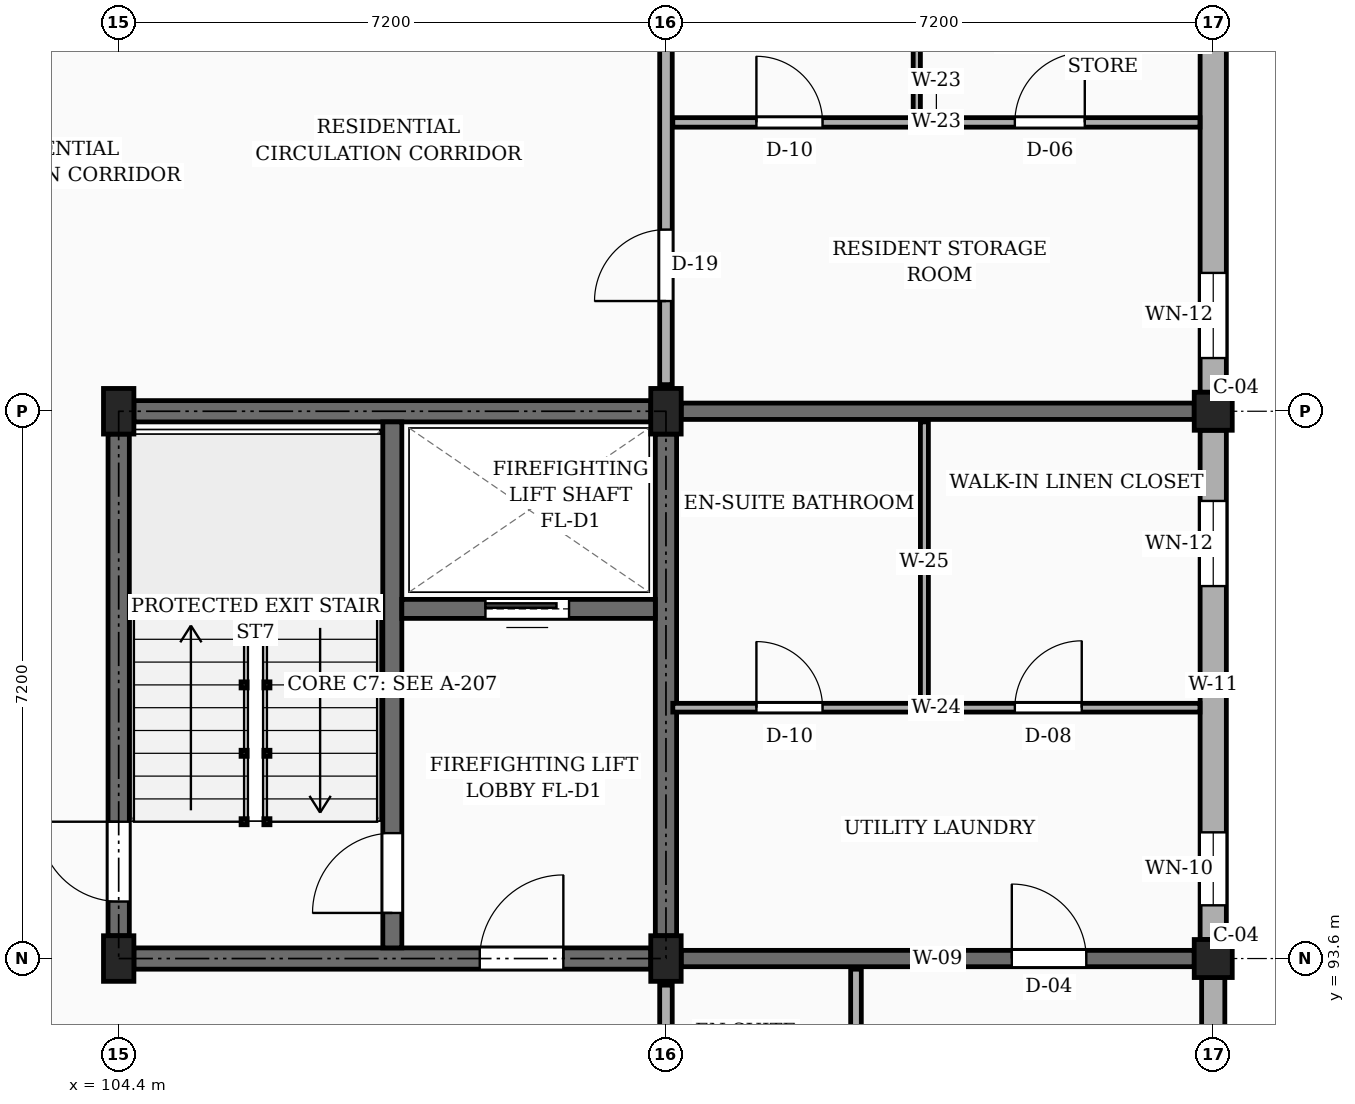
"""IFC4 building model, lengths in metres.
Left out: names, types, materials, properties, quantities, classifications, styles, units other than length and angle.
Written with IfcOpenShell. Run it as: python <this file> out.ifc"""

import sys

from ifc_helpers import new_model, si_unit, direction, frame, frame_2d, origin, origin_2d, place, context, subcontext, project, spatial, rectangle, extrude, element, fill, save


model = new_model("IFC4")
c1 = context("Model", 3, precision=1e-05, world=origin(), true_north=direction((0.0, 1.0)))
c2 = subcontext(c1, "Body", "Model", "MODEL_VIEW")
j1 = project(units=[si_unit("LENGTHUNIT", "METRE"), si_unit("PLANEANGLEUNIT", "RADIAN")], contexts=[c1])
p1 = place(None, origin())
s1 = spatial("IfcSite", under=j1, at=p1, CompositionType="ELEMENT")
p2 = place(p1, origin())
s2 = spatial("IfcBuilding", under=s1, at=p2, CompositionType="ELEMENT")
p3 = place(p2, frame((0.0, 0.0, 29.7)))
s3 = spatial("IfcBuildingStorey", under=s2, at=p3, CompositionType="ELEMENT", Elevation=29.7)
for number, where, z_axis, x_axis in (
    (1, (104.4, 93.6, 0.0), (0.0, 0.0, 1.0), (1.0, 0.0, 0.0)),
    (2, (104.4, 100.8, 0.0), (0.0, 0.0, 1.0), (1.0, 0.0, 0.0)),
    (3, (111.6, 93.6, 0.0), (0.0, 0.0, 1.0), (1.0, 0.0, 0.0)),
    (4, (111.6, 100.8, 0.0), (0.0, 0.0, 1.0), (1.0, 0.0, 0.0)),
):
    element("IfcColumn", number, at=place(p3, frame(where, z_axis=z_axis, x_axis=x_axis)), inside=s3, PredefinedType="COLUMN", context=c2, shape_type="SweptSolid", body=[
        extrude(rectangle(XDim=0.4, YDim=0.6, at=origin_2d()), origin(), (0.0, 0.0, 1.0), 3.15),
    ])
for number, where, z_axis, x_axis in (
    (5, (118.8, 93.6, 0.0), (0.0, 0.0, 1.0), (1.0, 0.0, 0.0)),
    (6, (118.8, 100.8, 0.0), (0.0, 0.0, 1.0), (1.0, 0.0, 0.0)),
):
    element("IfcColumn", number, at=place(p3, frame(where, z_axis=z_axis, x_axis=x_axis)), inside=s3, PredefinedType="COLUMN", context=c2, shape_type="SweptSolid", body=[
        extrude(rectangle(XDim=0.5, YDim=0.5, at=origin_2d()), origin(), (0.0, 0.0, 1.0), 3.15),
    ])
p4 = place(p3, frame((111.8, 93.6, 0.0), z_axis=(0.0, 0.0, 1.0), x_axis=(1.0, 0.0, 0.0)))
e7 = element("IfcWall", 7, at=p4, inside=s3, PredefinedType="SOLIDWALL", context=c2, shape_type="SweptSolid", body=[
    extrude(rectangle(XDim=6.75, YDim=0.215, at=frame_2d((3.375, 0.0))), origin(), (0.0, 0.0, 1.0), 2.19),
])
p5 = place(p4, frame((4.35, 0.0, 0.0)))
e8 = element("IfcOpeningElement", 8, at=p5, cuts=e7, PredefinedType="OPENING", context=c2, shape_type="SweptSolid", body=[
    extrude(rectangle(XDim=0.98, YDim=2.12, at=frame_2d((0.49, 1.06))), frame((0.0, 0.118, 0.0), z_axis=(0.0, -1.0, 0.0), x_axis=(1.0, 0.0, 0.0)), (0.0, 0.0, 1.0), 0.235),
])
p6 = place(p3, frame((111.8, 100.8, 0.0), z_axis=(0.0, 0.0, 1.0), x_axis=(1.0, 0.0, 0.0)))
e9 = element("IfcWall", 9, at=p6, inside=s3, PredefinedType="SOLIDWALL", context=c2, shape_type="SweptSolid", body=[
    extrude(rectangle(XDim=6.75, YDim=0.215, at=frame_2d((3.375, 0.0))), origin(), (0.0, 0.0, 1.0), 2.19),
])
p7 = place(p3, frame((118.8, 89.42, 0.0), z_axis=(0.0, 0.0, 1.0), x_axis=(0.0, 1.0, 0.0)))
e10 = element("IfcWall", 10, at=p7, inside=s3, PredefinedType="SOLIDWALL", context=c2, shape_type="SweptSolid", body=[
    extrude(rectangle(XDim=3.93, YDim=0.305, at=frame_2d((1.965, 0.0))), origin(), (0.0, 0.0, 1.0), 2.46),
])
p8 = place(p7, frame((1.86, 0.0, 0.78)))
e11 = element("IfcOpeningElement", 11, at=p8, cuts=e10, PredefinedType="OPENING", context=c2, shape_type="SweptSolid", body=[
    extrude(rectangle(XDim=0.88, YDim=1.26, at=frame_2d((0.44, 0.63))), frame((0.0, 0.163, 0.0), z_axis=(0.0, -1.0, 0.0), x_axis=(1.0, 0.0, 0.0)), (0.0, 0.0, 1.0), 0.325),
])
p9 = place(p3, frame((118.8, 93.85, 0.0), z_axis=(0.0, 0.0, 1.0), x_axis=(0.0, 1.0, 0.0)))
e12 = element("IfcWall", 12, at=p9, inside=s3, PredefinedType="SOLIDWALL", context=c2, shape_type="SweptSolid", body=[
    extrude(rectangle(XDim=6.7, YDim=0.345, at=frame_2d((3.35, 0.0))), origin(), (0.0, 0.0, 1.0), 2.46),
])
p10 = place(p9, frame((0.45, 0.0, 0.78)))
e13 = element("IfcOpeningElement", 13, at=p10, cuts=e12, PredefinedType="OPENING", context=c2, shape_type="SweptSolid", body=[
    extrude(rectangle(XDim=0.96, YDim=1.26, at=frame_2d((0.48, 0.63))), frame((0.0, 0.183, 0.0), z_axis=(0.0, -1.0, 0.0), x_axis=(1.0, 0.0, 0.0)), (0.0, 0.0, 1.0), 0.365),
])
p11 = place(p9, frame((4.65, 0.0, 0.78)))
e14 = element("IfcOpeningElement", 14, at=p11, cuts=e12, PredefinedType="OPENING", context=c2, shape_type="SweptSolid", body=[
    extrude(rectangle(XDim=1.12, YDim=1.26, at=frame_2d((0.56, 0.63))), frame((0.0, 0.183, 0.0), z_axis=(0.0, -1.0, 0.0), x_axis=(1.0, 0.0, 0.0)), (0.0, 0.0, 1.0), 0.365),
])
p12 = place(p3, frame((118.8, 101.05, 0.0), z_axis=(0.0, 0.0, 1.0), x_axis=(0.0, 1.0, 0.0)))
e15 = element("IfcWall", 15, at=p12, inside=s3, PredefinedType="SOLIDWALL", context=c2, shape_type="SweptSolid", body=[
    extrude(rectangle(XDim=6.7, YDim=0.345, at=frame_2d((3.35, 0.0))), origin(), (0.0, 0.0, 1.0), 2.46),
])
p13 = place(p12, frame((0.45, 0.0, 0.78)))
e16 = element("IfcOpeningElement", 16, at=p13, cuts=e15, PredefinedType="OPENING", context=c2, shape_type="SweptSolid", body=[
    extrude(rectangle(XDim=1.12, YDim=1.26, at=frame_2d((0.56, 0.63))), frame((0.0, 0.183, 0.0), z_axis=(0.0, -1.0, 0.0), x_axis=(1.0, 0.0, 0.0)), (0.0, 0.0, 1.0), 0.365),
])
p14 = place(p12, frame((4.65, 0.0, 0.78)))
e17 = element("IfcOpeningElement", 17, at=p14, cuts=e15, PredefinedType="OPENING", context=c2, shape_type="SweptSolid", body=[
    extrude(rectangle(XDim=1.28, YDim=1.26, at=frame_2d((0.64, 0.63))), frame((0.0, 0.183, 0.0), z_axis=(0.0, -1.0, 0.0), x_axis=(1.0, 0.0, 0.0)), (0.0, 0.0, 1.0), 0.365),
])
p15 = place(p3, frame((104.4, 93.9, 0.0), z_axis=(0.0, 0.0, 1.0), x_axis=(0.0, 1.0, 0.0)))
e18 = element("IfcWall", 18, at=p15, inside=s3, PredefinedType="SHEAR", context=c2, shape_type="SweptSolid", body=[
    extrude(rectangle(XDim=6.6, YDim=0.28, at=frame_2d((3.3, 0.0))), origin(), (0.0, 0.0, 1.0), 2.89),
])
p16 = place(p15, frame((0.45, 0.0, 0.0)))
e19 = element("IfcOpeningElement", 19, at=p16, cuts=e18, PredefinedType="OPENING", context=c2, shape_type="SweptSolid", body=[
    extrude(rectangle(XDim=1.05, YDim=2.15, at=frame_2d((0.525, 1.075))), frame((0.0, 0.15, 0.0), z_axis=(0.0, -1.0, 0.0), x_axis=(1.0, 0.0, 0.0)), (0.0, 0.0, 1.0), 0.3),
])
p17 = place(p3, frame((104.6, 100.8, 0.0), z_axis=(0.0, 0.0, 1.0), x_axis=(1.0, 0.0, 0.0)))
e20 = element("IfcWall", 20, at=p17, inside=s3, PredefinedType="SHEAR", context=c2, shape_type="SweptSolid", body=[
    extrude(rectangle(XDim=6.8, YDim=0.28, at=frame_2d((3.4, 0.0))), origin(), (0.0, 0.0, 1.0), 2.89),
])
p18 = place(p3, frame((111.6, 93.9, 0.0), z_axis=(0.0, 0.0, 1.0), x_axis=(0.0, 1.0, 0.0)))
e21 = element("IfcWall", 21, at=p18, inside=s3, PredefinedType="SHEAR", context=c2, shape_type="SweptSolid", body=[
    extrude(rectangle(XDim=6.6, YDim=0.28, at=frame_2d((3.3, 0.0))), origin(), (0.0, 0.0, 1.0), 2.89),
])
p19 = place(p3, frame((104.6, 93.6, 0.0), z_axis=(0.0, 0.0, 1.0), x_axis=(1.0, 0.0, 0.0)))
e22 = element("IfcWall", 22, at=p19, inside=s3, PredefinedType="SHEAR", context=c2, shape_type="SweptSolid", body=[
    extrude(rectangle(XDim=6.8, YDim=0.28, at=frame_2d((3.4, 0.0))), origin(), (0.0, 0.0, 1.0), 2.89),
])
p20 = place(p19, frame((4.55, 0.0, 0.0)))
e23 = element("IfcOpeningElement", 23, at=p20, cuts=e22, PredefinedType="OPENING", context=c2, shape_type="SweptSolid", body=[
    extrude(rectangle(XDim=1.1, YDim=2.15, at=frame_2d((0.55, 1.075))), frame((0.0, 0.15, 0.0), z_axis=(0.0, -1.0, 0.0), x_axis=(1.0, 0.0, 0.0)), (0.0, 0.0, 1.0), 0.3),
])
p21 = place(p3, frame((108.0, 93.74, 0.0), z_axis=(0.0, 0.0, 1.0), x_axis=(0.0, 1.0, 0.0)))
e24 = element("IfcWall", 24, at=p21, inside=s3, PredefinedType="SHEAR", context=c2, shape_type="SweptSolid", body=[
    extrude(rectangle(XDim=6.92, YDim=0.25, at=frame_2d((3.46, 0.0))), origin(), (0.0, 0.0, 1.0), 2.89),
])
p22 = place(p21, frame((0.46, 0.0, 0.0)))
e25 = element("IfcOpeningElement", 25, at=p22, cuts=e24, PredefinedType="OPENING", context=c2, shape_type="SweptSolid", body=[
    extrude(rectangle(XDim=1.05, YDim=2.15, at=frame_2d((0.525, 1.075))), frame((0.0, 0.135, 0.0), z_axis=(0.0, -1.0, 0.0), x_axis=(1.0, 0.0, 0.0)), (0.0, 0.0, 1.0), 0.27),
])
p23 = place(p3, frame((108.125, 98.2, 0.0), z_axis=(0.0, 0.0, 1.0), x_axis=(1.0, 0.0, 0.0)))
e26 = element("IfcWall", 26, at=p23, inside=s3, PredefinedType="SHEAR", context=c2, shape_type="SweptSolid", body=[
    extrude(rectangle(XDim=3.335, YDim=0.25, at=frame_2d((1.667, 0.0))), origin(), (0.0, 0.0, 1.0), 2.89),
])
p24 = place(p23, frame((1.1, 0.0, 0.0)))
e27 = element("IfcOpeningElement", 27, at=p24, cuts=e26, PredefinedType="OPENING", context=c2, shape_type="SweptSolid", body=[
    extrude(rectangle(XDim=1.1, YDim=2.2, at=frame_2d((0.55, 1.1))), frame((0.0, 0.135, 0.0), z_axis=(0.0, -1.0, 0.0), x_axis=(1.0, 0.0, 0.0)), (0.0, 0.0, 1.0), 0.27),
])
p25 = place(p3, frame((111.6, 86.75, 0.0), z_axis=(0.0, 0.0, 1.0), x_axis=(0.0, 1.0, 0.0)))
e28 = element("IfcWall", 28, at=p25, inside=s3, PredefinedType="PARTITIONING", context=c2, shape_type="SweptSolid", body=[
    extrude(rectangle(XDim=6.5, YDim=0.165, at=frame_2d((3.25, 0.0))), origin(), (0.0, 0.0, 1.0), 2.325),
])
p26 = place(p25, frame((1.0, 0.0, 0.0)))
e29 = element("IfcOpeningElement", 29, at=p26, cuts=e28, PredefinedType="OPENING", context=c2, shape_type="SweptSolid", body=[
    extrude(rectangle(XDim=1.0, YDim=2.15, at=frame_2d((0.5, 1.075))), frame((0.0, 0.093, 0.0), z_axis=(0.0, -1.0, 0.0), x_axis=(1.0, 0.0, 0.0)), (0.0, 0.0, 1.0), 0.185),
])
p27 = place(p3, frame((111.6, 101.15, 0.0), z_axis=(0.0, 0.0, 1.0), x_axis=(0.0, 1.0, 0.0)))
e30 = element("IfcWall", 30, at=p27, inside=s3, PredefinedType="PARTITIONING", context=c2, shape_type="SweptSolid", body=[
    extrude(rectangle(XDim=6.5, YDim=0.165, at=frame_2d((3.25, 0.0))), origin(), (0.0, 0.0, 1.0), 2.325),
])
p28 = place(p27, frame((1.1, 0.0, 0.0)))
e31 = element("IfcOpeningElement", 31, at=p28, cuts=e30, PredefinedType="OPENING", context=c2, shape_type="SweptSolid", body=[
    extrude(rectangle(XDim=0.94, YDim=2.12, at=frame_2d((0.47, 1.06))), frame((0.0, 0.093, 0.0), z_axis=(0.0, -1.0, 0.0), x_axis=(1.0, 0.0, 0.0)), (0.0, 0.0, 1.0), 0.185),
])
p29 = place(p3, frame((114.1, 86.575, 0.0), z_axis=(0.0, 0.0, 1.0), x_axis=(0.0, 1.0, 0.0)))
e32 = element("IfcWall", 32, at=p29, inside=s3, PredefinedType="PARTITIONING", context=c2, shape_type="SweptSolid", body=[
    extrude(rectangle(XDim=6.885, YDim=0.14, at=frame_2d((3.442, 0.0))), origin(), (0.0, 0.0, 1.0), 2.325),
])
p30 = place(p29, frame((1.275, 0.0, 0.0)))
e33 = element("IfcOpeningElement", 33, at=p30, cuts=e32, PredefinedType="OPENING", context=c2, shape_type="SweptSolid", body=[
    extrude(rectangle(XDim=0.95, YDim=2.1, at=frame_2d((0.475, 1.05))), frame((0.0, 0.08, 0.0), z_axis=(0.0, -1.0, 0.0), x_axis=(1.0, 0.0, 0.0)), (0.0, 0.0, 1.0), 0.16),
])
p31 = place(p3, frame((111.69, 96.9, 0.0), z_axis=(0.0, 0.0, 1.0), x_axis=(1.0, 0.0, 0.0)))
e34 = element("IfcWall", 34, at=p31, inside=s3, PredefinedType="PARTITIONING", context=c2, shape_type="SweptSolid", body=[
    extrude(rectangle(XDim=6.935, YDim=0.115, at=frame_2d((3.468, 0.0))), origin(), (0.0, 0.0, 1.0), 2.325),
])
p32 = place(p31, frame((1.1, 0.0, 0.0)))
e35 = element("IfcOpeningElement", 35, at=p32, cuts=e34, PredefinedType="OPENING", context=c2, shape_type="SweptSolid", body=[
    extrude(rectangle(XDim=0.87, YDim=2.05, at=frame_2d((0.435, 1.025))), frame((0.0, 0.067, 0.0), z_axis=(0.0, -1.0, 0.0), x_axis=(1.0, 0.0, 0.0)), (0.0, 0.0, 1.0), 0.135),
])
p33 = place(p31, frame((4.5, 0.0, 0.0)))
e36 = element("IfcOpeningElement", 36, at=p33, cuts=e34, PredefinedType="OPENING", context=c2, shape_type="SweptSolid", body=[
    extrude(rectangle(XDim=0.88, YDim=2.08, at=frame_2d((0.44, 1.04))), frame((0.0, 0.067, 0.0), z_axis=(0.0, -1.0, 0.0), x_axis=(1.0, 0.0, 0.0)), (0.0, 0.0, 1.0), 0.135),
])
p34 = place(p3, frame((115.0, 96.97, 0.0), z_axis=(0.0, 0.0, 1.0), x_axis=(0.0, 1.0, 0.0)))
e37 = element("IfcWall", 37, at=p34, inside=s3, PredefinedType="PARTITIONING", context=c2, shape_type="SweptSolid", body=[
    extrude(rectangle(XDim=3.69, YDim=0.105, at=frame_2d((1.845, 0.0))), origin(), (0.0, 0.0, 1.0), 2.325),
])
p35 = place(p3, frame((111.69, 104.6, 0.0), z_axis=(0.0, 0.0, 1.0), x_axis=(1.0, 0.0, 0.0)))
e38 = element("IfcWall", 38, at=p35, inside=s3, PredefinedType="PARTITIONING", context=c2, shape_type="SweptSolid", body=[
    extrude(rectangle(XDim=6.935, YDim=0.125, at=frame_2d((3.468, 0.0))), origin(), (0.0, 0.0, 1.0), 2.325),
])
p36 = place(p35, frame((1.1, 0.0, 0.0)))
e39 = element("IfcOpeningElement", 39, at=p36, cuts=e38, PredefinedType="OPENING", context=c2, shape_type="SweptSolid", body=[
    extrude(rectangle(XDim=0.87, YDim=2.05, at=frame_2d((0.435, 1.025))), frame((0.0, 0.073, 0.0), z_axis=(0.0, -1.0, 0.0), x_axis=(1.0, 0.0, 0.0)), (0.0, 0.0, 1.0), 0.145),
])
p37 = place(p35, frame((4.5, 0.0, 0.0)))
e40 = element("IfcOpeningElement", 40, at=p37, cuts=e38, PredefinedType="OPENING", context=c2, shape_type="SweptSolid", body=[
    extrude(rectangle(XDim=0.92, YDim=2.1, at=frame_2d((0.46, 1.05))), frame((0.0, 0.073, 0.0), z_axis=(0.0, -1.0, 0.0), x_axis=(1.0, 0.0, 0.0)), (0.0, 0.0, 1.0), 0.145),
])
p38 = place(p3, frame((114.9, 104.67, 0.0), z_axis=(0.0, 0.0, 1.0), x_axis=(0.0, 1.0, 0.0)))
e41 = element("IfcWall", 41, at=p38, inside=s3, PredefinedType="PARTITIONING", context=c2, shape_type="SweptSolid", body=[
    extrude(rectangle(XDim=3.19, YDim=0.095, at=frame_2d((1.595, 0.0))), origin(), (0.0, 0.0, 1.0), 2.325),
])
p39 = place(p10, origin())
e42 = element("IfcWindow", 42, at=p39, inside=s3, PartitioningType="SINGLE_PANEL", PredefinedType="WINDOW", context=c2, shape_type="SweptSolid", body=[
    extrude(rectangle(XDim=0.96, YDim=1.26, at=frame_2d((0.48, 0.63))), frame((0.0, 0.03, 0.0), z_axis=(0.0, -1.0, 0.0), x_axis=(1.0, 0.0, 0.0)), (0.0, 0.0, 1.0), 0.06),
])
fill(e13, e42)
p40 = place(p11, origin())
e43 = element("IfcWindow", 43, at=p40, inside=s3, PartitioningType="SINGLE_PANEL", PredefinedType="WINDOW", context=c2, shape_type="SweptSolid", body=[
    extrude(rectangle(XDim=1.12, YDim=1.26, at=frame_2d((0.56, 0.63))), frame((0.0, 0.03, 0.0), z_axis=(0.0, -1.0, 0.0), x_axis=(1.0, 0.0, 0.0)), (0.0, 0.0, 1.0), 0.06),
])
fill(e14, e43)
p41 = place(p13, origin())
e44 = element("IfcWindow", 44, at=p41, inside=s3, PartitioningType="SINGLE_PANEL", PredefinedType="WINDOW", context=c2, shape_type="SweptSolid", body=[
    extrude(rectangle(XDim=1.12, YDim=1.26, at=frame_2d((0.56, 0.63))), frame((0.0, 0.03, 0.0), z_axis=(0.0, -1.0, 0.0), x_axis=(1.0, 0.0, 0.0)), (0.0, 0.0, 1.0), 0.06),
])
fill(e16, e44)
p42 = place(p16, origin())
e45 = element("IfcDoor", 45, at=p42, inside=s3, OperationType="SINGLE_SWING_RIGHT", PredefinedType="DOOR", context=c2, shape_type="SweptSolid", body=[
    extrude(rectangle(XDim=1.05, YDim=2.15, at=frame_2d((0.525, 1.075))), frame((0.0, 0.025, 0.0), z_axis=(0.0, -1.0, 0.0), x_axis=(1.0, 0.0, 0.0)), (0.0, 0.0, 1.0), 0.05),
])
fill(e19, e45)
p43 = place(p20, frame((1.1, 0.0, 0.0), z_axis=(0.0, 0.0, 1.0), x_axis=(-1.0, 0.0, 0.0)))
e46 = element("IfcDoor", 46, at=p43, inside=s3, OperationType="SINGLE_SWING_RIGHT", PredefinedType="DOOR", context=c2, shape_type="SweptSolid", body=[
    extrude(rectangle(XDim=1.1, YDim=2.15, at=frame_2d((0.55, 1.075))), frame((0.0, 0.025, 0.0), z_axis=(0.0, -1.0, 0.0), x_axis=(1.0, 0.0, 0.0)), (0.0, 0.0, 1.0), 0.05),
])
fill(e23, e46)
p44 = place(p22, origin())
e47 = element("IfcDoor", 47, at=p44, inside=s3, OperationType="SINGLE_SWING_LEFT", PredefinedType="DOOR", context=c2, shape_type="SweptSolid", body=[
    extrude(rectangle(XDim=1.05, YDim=2.15, at=frame_2d((0.525, 1.075))), frame((0.0, 0.025, 0.0), z_axis=(0.0, -1.0, 0.0), x_axis=(1.0, 0.0, 0.0)), (0.0, 0.0, 1.0), 0.05),
])
fill(e25, e47)
p45 = place(p24, origin())
e48 = element("IfcDoor", 48, at=p45, inside=s3, OperationType="SLIDING_TO_LEFT", PredefinedType="DOOR", context=c2, shape_type="SweptSolid", body=[
    extrude(rectangle(XDim=1.1, YDim=2.2, at=frame_2d((0.55, 1.1))), frame((0.0, 0.025, 0.0), z_axis=(0.0, -1.0, 0.0), x_axis=(1.0, 0.0, 0.0)), (0.0, 0.0, 1.0), 0.05),
])
fill(e27, e48)
p46 = place(p28, origin())
e49 = element("IfcDoor", 49, at=p46, inside=s3, OperationType="SINGLE_SWING_LEFT", PredefinedType="DOOR", context=c2, shape_type="SweptSolid", body=[
    extrude(rectangle(XDim=0.94, YDim=2.12, at=frame_2d((0.47, 1.06))), frame((0.0, 0.025, 0.0), z_axis=(0.0, -1.0, 0.0), x_axis=(1.0, 0.0, 0.0)), (0.0, 0.0, 1.0), 0.05),
])
fill(e31, e49)
p47 = place(p32, origin())
e50 = element("IfcDoor", 50, at=p47, inside=s3, OperationType="SINGLE_SWING_LEFT", PredefinedType="DOOR", context=c2, shape_type="SweptSolid", body=[
    extrude(rectangle(XDim=0.87, YDim=2.05, at=frame_2d((0.435, 1.025))), frame((0.0, 0.025, 0.0), z_axis=(0.0, -1.0, 0.0), x_axis=(1.0, 0.0, 0.0)), (0.0, 0.0, 1.0), 0.05),
])
fill(e35, e50)
p48 = place(p33, origin())
e51 = element("IfcDoor", 51, at=p48, inside=s3, OperationType="SINGLE_SWING_RIGHT", PredefinedType="DOOR", context=c2, shape_type="SweptSolid", body=[
    extrude(rectangle(XDim=0.88, YDim=2.08, at=frame_2d((0.44, 1.04))), frame((0.0, 0.025, 0.0), z_axis=(0.0, -1.0, 0.0), x_axis=(1.0, 0.0, 0.0)), (0.0, 0.0, 1.0), 0.05),
])
fill(e36, e51)
p49 = place(p36, origin())
e52 = element("IfcDoor", 52, at=p49, inside=s3, OperationType="SINGLE_SWING_LEFT", PredefinedType="DOOR", context=c2, shape_type="SweptSolid", body=[
    extrude(rectangle(XDim=0.87, YDim=2.05, at=frame_2d((0.435, 1.025))), frame((0.0, 0.025, 0.0), z_axis=(0.0, -1.0, 0.0), x_axis=(1.0, 0.0, 0.0)), (0.0, 0.0, 1.0), 0.05),
])
fill(e39, e52)
p50 = place(p37, origin())
e53 = element("IfcDoor", 53, at=p50, inside=s3, OperationType="SINGLE_SWING_RIGHT", PredefinedType="DOOR", context=c2, shape_type="SweptSolid", body=[
    extrude(rectangle(XDim=0.92, YDim=2.1, at=frame_2d((0.46, 1.05))), frame((0.0, 0.025, 0.0), z_axis=(0.0, -1.0, 0.0), x_axis=(1.0, 0.0, 0.0)), (0.0, 0.0, 1.0), 0.05),
])
fill(e40, e53)
p51 = place(p5, origin())
e54 = element("IfcDoor", 54, at=p51, inside=s3, OperationType="SINGLE_SWING_LEFT", PredefinedType="DOOR", context=c2, shape_type="SweptSolid", body=[
    extrude(rectangle(XDim=0.98, YDim=2.12, at=frame_2d((0.49, 1.06))), frame((0.0, 0.025, 0.0), z_axis=(0.0, -1.0, 0.0), x_axis=(1.0, 0.0, 0.0)), (0.0, 0.0, 1.0), 0.05),
])
fill(e8, e54)
save(model, sys.argv[1])
